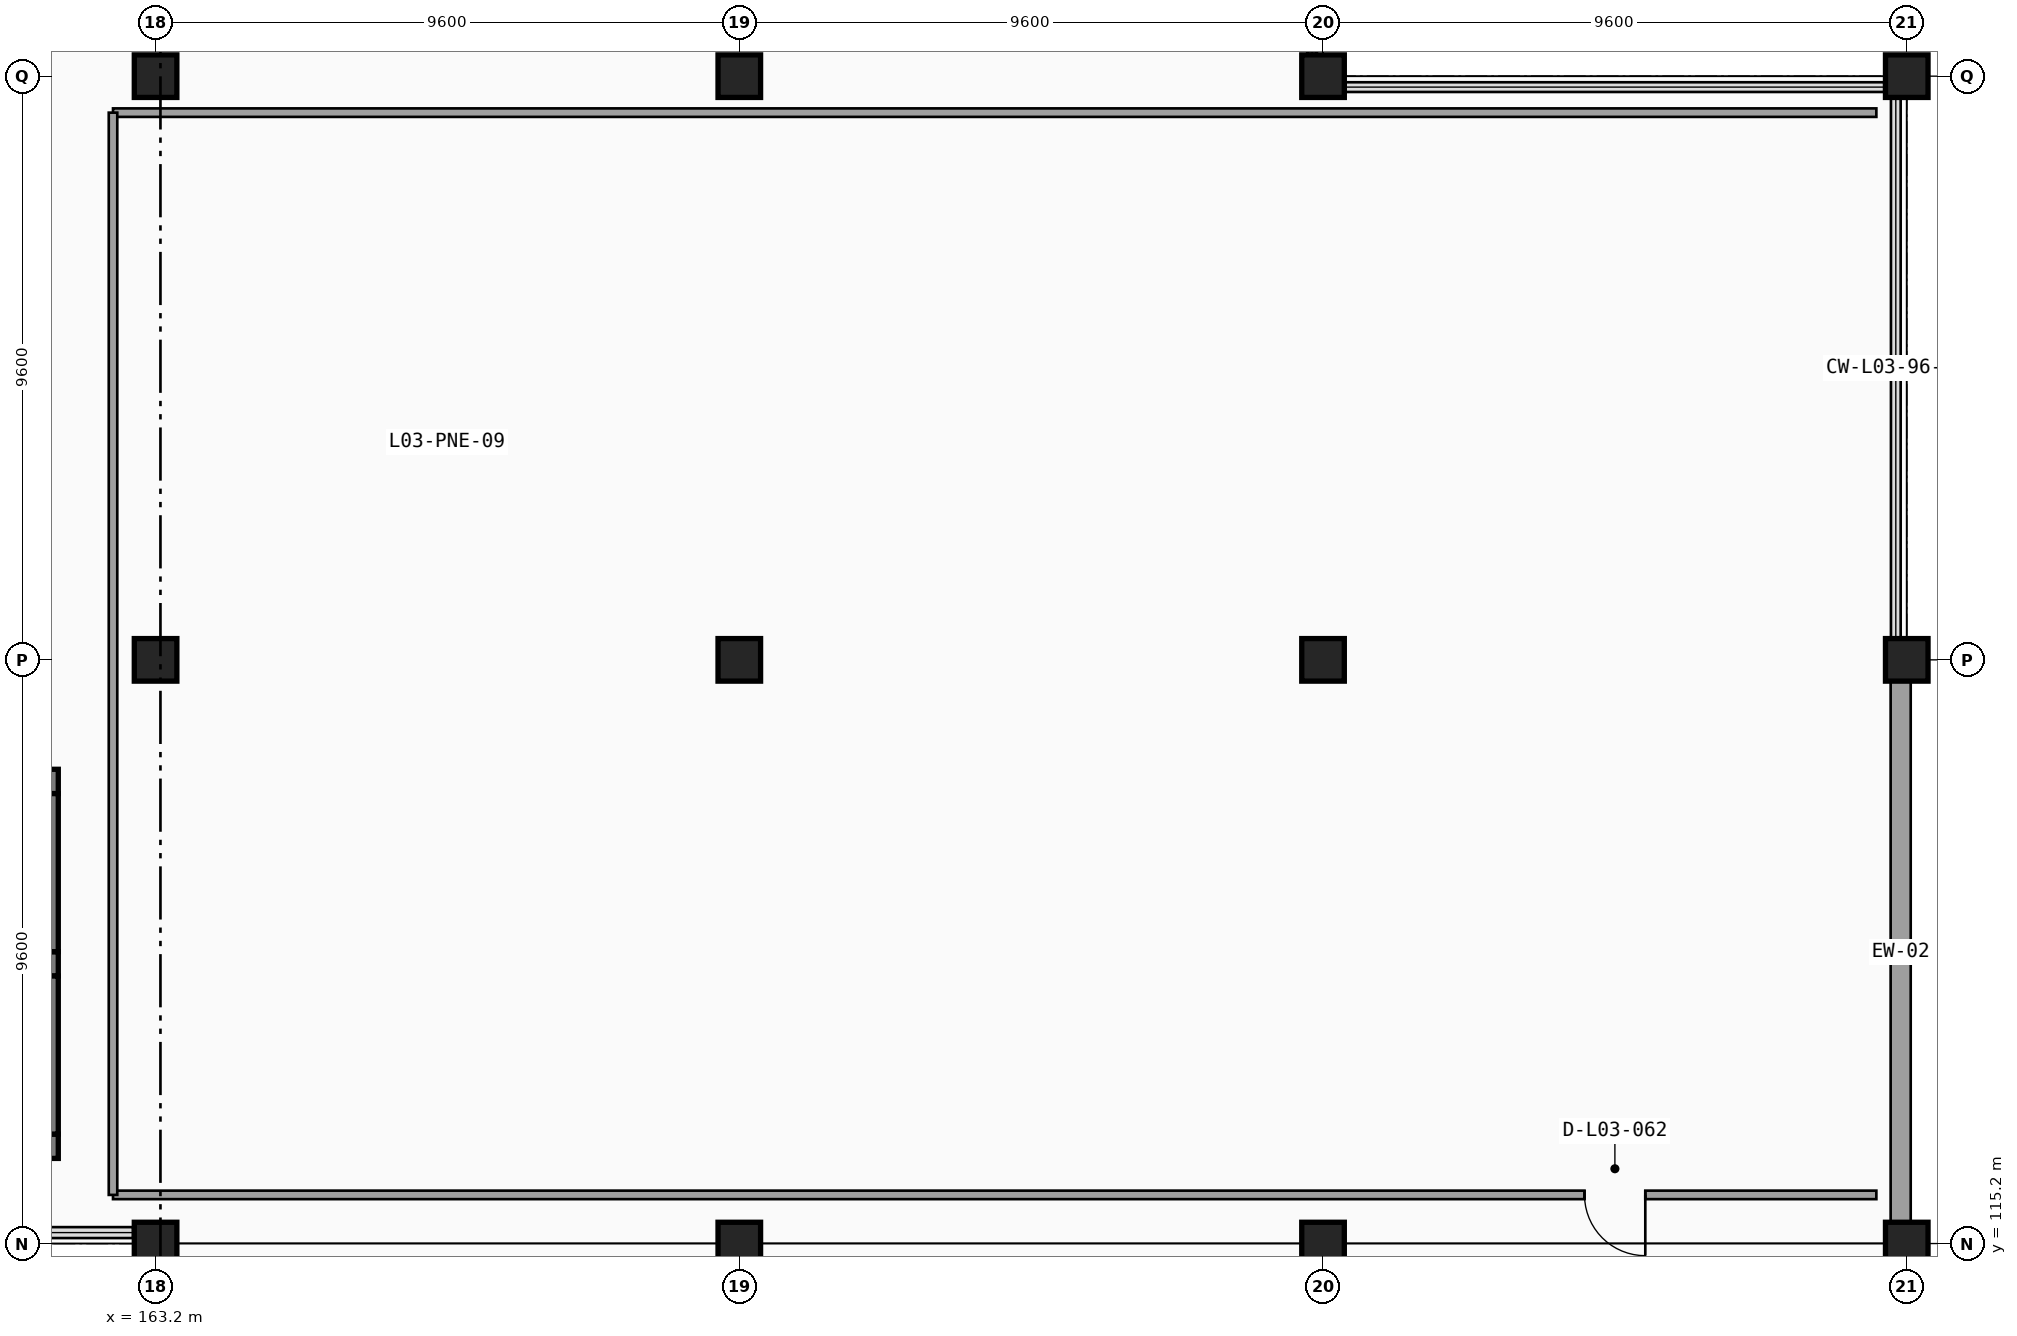
"""IFC4 building model, lengths in metres.
Left out: names, types, materials, properties, quantities, classifications, styles, units other than length and angle.
Written with IfcOpenShell. Run it as: python <this file> out.ifc"""

import sys

from ifc_helpers import new_model, si_unit, direction, frame, frame_2d, origin, origin_2d, place, context, subcontext, project, spatial, rectangle, extrude, element, fill, save


model = new_model("IFC4")
c1 = context("Model", 3, precision=1e-05, world=origin(), true_north=direction((0.0, 1.0)))
c2 = subcontext(c1, "Body", "Model", "MODEL_VIEW")
j1 = project(units=[si_unit("LENGTHUNIT", "METRE"), si_unit("PLANEANGLEUNIT", "RADIAN")], contexts=[c1])
p1 = place(None, origin())
s1 = spatial("IfcSite", under=j1, at=p1, CompositionType="ELEMENT")
p2 = place(p1, origin())
s2 = spatial("IfcBuilding", under=s1, at=p2, CompositionType="ELEMENT")
p3 = place(p2, frame((0.0, 0.0, 14.1)))
s3 = spatial("IfcBuildingStorey", under=s2, at=p3, CompositionType="ELEMENT", Elevation=14.1)
for number, where, z_axis, x_axis in (
    (1, (163.2, 115.2, 0.0), (0.0, 0.0, 1.0), (1.0, 0.0, 0.0)),
    (2, (163.2, 124.8, 0.0), (0.0, 0.0, 1.0), (1.0, 0.0, 0.0)),
    (3, (163.2, 134.4, 0.0), (0.0, 0.0, 1.0), (1.0, 0.0, 0.0)),
    (4, (172.8, 115.2, 0.0), (0.0, 0.0, 1.0), (1.0, 0.0, 0.0)),
    (5, (172.8, 124.8, 0.0), (0.0, 0.0, 1.0), (1.0, 0.0, 0.0)),
    (6, (172.8, 134.4, 0.0), (0.0, 0.0, 1.0), (1.0, 0.0, 0.0)),
    (7, (182.4, 115.2, 0.0), (0.0, 0.0, 1.0), (1.0, 0.0, 0.0)),
    (8, (182.4, 124.8, 0.0), (0.0, 0.0, 1.0), (1.0, 0.0, 0.0)),
    (9, (182.4, 134.4, 0.0), (0.0, 0.0, 1.0), (1.0, 0.0, 0.0)),
    (10, (192.0, 115.2, 0.0), (0.0, 0.0, 1.0), (1.0, 0.0, 0.0)),
    (11, (192.0, 124.8, 0.0), (0.0, 0.0, 1.0), (1.0, 0.0, 0.0)),
    (12, (192.0, 134.4, 0.0), (0.0, 0.0, 1.0), (1.0, 0.0, 0.0)),
):
    element("IfcColumn", number, at=place(p3, frame(where, z_axis=z_axis, x_axis=x_axis)), inside=s3, PredefinedType="COLUMN", context=c2, shape_type="SweptSolid", body=[
        extrude(rectangle(XDim=0.7, YDim=0.7, at=origin_2d()), origin(), (0.0, 0.0, 1.0), 4.5),
    ])
p4 = place(p3, frame((191.82, 105.6, 0.0), z_axis=(0.0, 0.0, 1.0), x_axis=(0.0, 1.0, 0.0)))
e13 = element("IfcWall", 13, at=p4, inside=s3, PredefinedType="SOLIDWALL", context=c2, shape_type="SweptSolid", body=[
    extrude(rectangle(XDim=9.6, YDim=0.29, at=frame_2d((4.8, 0.0))), origin(), (0.0, 0.0, 1.0), 3.313),
])
p5 = place(p4, frame((3.867, 0.0, 0.95), z_axis=(0.0, 0.0, 1.0), x_axis=(-1.0, 0.0, 0.0)))
e14 = element("IfcOpeningElement", 14, at=p5, cuts=e13, PredefinedType="OPENING", context=c2, shape_type="SweptSolid", body=[
    extrude(rectangle(XDim=2.0, YDim=2.0, at=frame_2d((1.0, 1.0))), frame((0.0, 0.155, 0.0), z_axis=(0.0, -1.0, 0.0), x_axis=(1.0, 0.0, 0.0)), (0.0, 0.0, 1.0), 0.31),
])
p6 = place(p4, frame((7.733, 0.0, 0.95), z_axis=(0.0, 0.0, 1.0), x_axis=(-1.0, 0.0, 0.0)))
e15 = element("IfcOpeningElement", 15, at=p6, cuts=e13, PredefinedType="OPENING", context=c2, shape_type="SweptSolid", body=[
    extrude(rectangle(XDim=2.0, YDim=2.0, at=frame_2d((1.0, 1.0))), frame((0.0, 0.155, 0.0), z_axis=(0.0, -1.0, 0.0), x_axis=(1.0, 0.0, 0.0)), (0.0, 0.0, 1.0), 0.31),
])
p7 = place(p3, frame((191.9, 115.2, 0.0), z_axis=(0.0, 0.0, 1.0), x_axis=(0.0, 1.0, 0.0)))
e16 = element("IfcWall", 16, at=p7, inside=s3, PredefinedType="SOLIDWALL", context=c2, shape_type="SweptSolid", body=[
    extrude(rectangle(XDim=9.6, YDim=0.33, at=frame_2d((4.8, 0.0))), origin(), (0.0, 0.0, 1.0), 3.313),
])
for number, where, z_axis, x_axis in (
    (17, (158.4, 116.8, 0.0), (0.0, 0.0, 1.0), (1.0, 0.0, 0.0)),
    (18, (161.6, 119.8, 0.0), (0.0, 0.0, 1.0), (-1.0, 0.0, 0.0)),
):
    element("IfcWall", number, at=place(p3, frame(where, z_axis=z_axis, x_axis=x_axis)), inside=s3, PredefinedType="SHEAR", context=c2, shape_type="SweptSolid", body=[
        extrude(rectangle(XDim=3.2, YDim=0.4, at=frame_2d((1.6, 0.0))), origin(), (0.0, 0.0, 1.0), 4.24),
    ])
p8 = place(p3, frame((161.4, 117.0, 0.0), z_axis=(0.0, 0.0, 1.0), x_axis=(0.0, 1.0, 0.0)))
e19 = element("IfcWall", 19, at=p8, inside=s3, PredefinedType="SHEAR", context=c2, shape_type="SweptSolid", body=[
    extrude(rectangle(XDim=2.6, YDim=0.4, at=frame_2d((1.3, 0.0))), origin(), (0.0, 0.0, 1.0), 4.24),
])
p9 = place(p3, frame((161.6, 122.8, 0.0), z_axis=(0.0, 0.0, 1.0), x_axis=(-1.0, 0.0, 0.0)))
e20 = element("IfcWall", 20, at=p9, inside=s3, PredefinedType="SHEAR", context=c2, shape_type="SweptSolid", body=[
    extrude(rectangle(XDim=3.2, YDim=0.4, at=frame_2d((1.6, 0.0))), origin(), (0.0, 0.0, 1.0), 4.24),
])
p10 = place(p3, frame((161.4, 120.0, 0.0), z_axis=(0.0, 0.0, 1.0), x_axis=(0.0, 1.0, 0.0)))
e21 = element("IfcWall", 21, at=p10, inside=s3, PredefinedType="SHEAR", context=c2, shape_type="SweptSolid", body=[
    extrude(rectangle(XDim=2.6, YDim=0.4, at=frame_2d((1.3, 0.0))), origin(), (0.0, 0.0, 1.0), 4.24),
])
p11 = place(p3, frame((162.5, 133.8, 0.0), z_axis=(0.0, 0.0, 1.0), x_axis=(1.0, 0.0, 0.0)))
e22 = element("IfcWall", 22, at=p11, inside=s3, PredefinedType="PARTITIONING", context=c2, shape_type="SweptSolid", body=[
    extrude(rectangle(XDim=29.0, YDim=0.14, at=frame_2d((14.5, 0.0))), origin(), (0.0, 0.0, 1.0), 3.49),
])
p12 = place(p3, frame((191.5, 116.0, 0.0), z_axis=(0.0, 0.0, 1.0), x_axis=(-1.0, 0.0, 0.0)))
e23 = element("IfcWall", 23, at=p12, inside=s3, PredefinedType="PARTITIONING", context=c2, shape_type="SweptSolid", body=[
    extrude(rectangle(XDim=29.0, YDim=0.14, at=frame_2d((14.5, 0.0))), origin(), (0.0, 0.0, 1.0), 3.313),
])
p13 = place(p12, frame((3.8, 0.0, 0.0), z_axis=(0.0, 0.0, 1.0), x_axis=(1.0, 0.0, 0.0)))
e24 = element("IfcOpeningElement", 24, at=p13, cuts=e23, PredefinedType="OPENING", context=c2, shape_type="SweptSolid", body=[
    extrude(rectangle(XDim=1.0, YDim=2.2, at=frame_2d((0.5, 1.1))), frame((0.0, 0.08, 0.0), z_axis=(0.0, -1.0, 0.0), x_axis=(1.0, 0.0, 0.0)), (0.0, 0.0, 1.0), 0.16),
])
p14 = place(p3, frame((162.5, 116.0, 0.0), z_axis=(0.0, 0.0, 1.0), x_axis=(0.0, 1.0, 0.0)))
e25 = element("IfcWall", 25, at=p14, inside=s3, PredefinedType="PARTITIONING", context=c2, shape_type="SweptSolid", body=[
    extrude(rectangle(XDim=17.8, YDim=0.14, at=frame_2d((8.9, 0.0))), origin(), (0.0, 0.0, 1.0), 3.556),
])
p15 = place(p13, origin())
e26 = element("IfcDoor", 26, at=p15, inside=s3, OperationType="SINGLE_SWING_LEFT", PredefinedType="DOOR", context=c2, shape_type="SweptSolid", body=[
    extrude(rectangle(XDim=1.0, YDim=2.2, at=frame_2d((0.5, 1.1))), frame((0.0, 0.025, 0.0), z_axis=(0.0, -1.0, 0.0), x_axis=(1.0, 0.0, 0.0)), (0.0, 0.0, 1.0), 0.05),
])
fill(e24, e26)
save(model, sys.argv[1])
